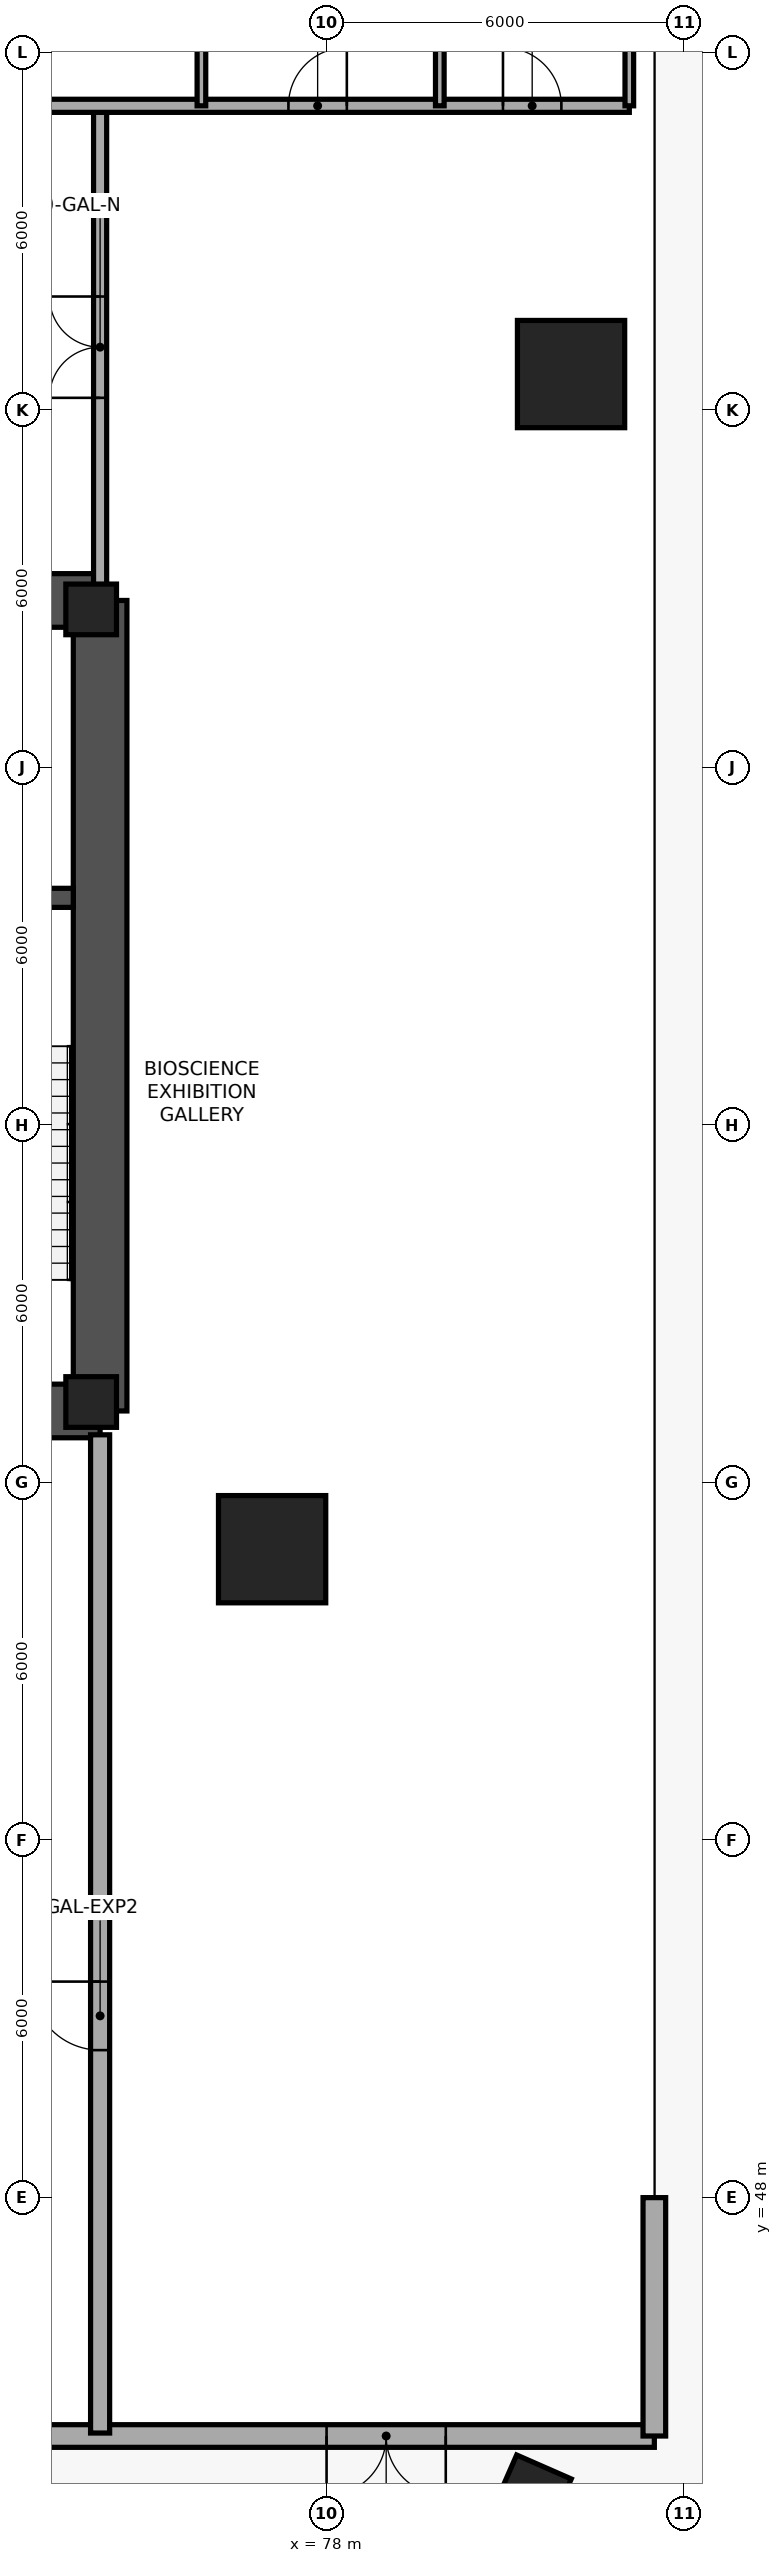
"""IFC4 building model, lengths in metres.
Left out: names, types, materials, properties, quantities, classifications, styles, units other than length and angle.
Written with IfcOpenShell. Run it as: python <this file> out.ifc"""

import sys

from ifc_helpers import new_model, si_unit, direction, frame, frame_2d, origin, origin_2d, place, context, subcontext, project, spatial, rectangle, extrude, element, fill, save


model = new_model("IFC4")
c1 = context("Model", 3, precision=1e-05, world=origin(), true_north=direction((0.0, 1.0)))
c2 = subcontext(c1, "Body", "Model", "MODEL_VIEW")
j1 = project(units=[si_unit("LENGTHUNIT", "METRE"), si_unit("PLANEANGLEUNIT", "RADIAN")], contexts=[c1])
p1 = place(None, origin())
s1 = spatial("IfcSite", under=j1, at=p1, CompositionType="ELEMENT")
p2 = place(p1, origin())
s2 = spatial("IfcBuilding", under=s1, at=p2, CompositionType="ELEMENT")
p3 = place(p2, origin())
s3 = spatial("IfcBuildingStorey", under=s2, at=p3, CompositionType="ELEMENT", Elevation=0.0)
p4 = place(p3, frame((57.8, 61.2, 0.0), z_axis=(0.0, 0.0, 1.0), x_axis=(1.0, 0.0, 0.0)))
e1 = element("IfcWall", 1, at=p4, inside=s3, PredefinedType="SHEAR", context=c2, shape_type="SweptSolid", body=[
    extrude(rectangle(XDim=16.4, YDim=0.9, at=frame_2d((8.2, 0.0))), origin(), (0.0, 0.0, 1.0), 5.4),
])
p5 = place(p4, frame((1.35, 0.0, 0.0)))
e2 = element("IfcOpeningElement", 2, at=p5, cuts=e1, PredefinedType="OPENING", context=c2, shape_type="SweptSolid", body=[
    extrude(rectangle(XDim=1.15, YDim=2.15, at=frame_2d((0.575, 1.075))), frame((0.0, 0.46, 0.0), z_axis=(0.0, -1.0, 0.0), x_axis=(1.0, 0.0, 0.0)), (0.0, 0.0, 1.0), 0.92),
])
p6 = place(p4, frame((6.1, 0.0, 0.0)))
e3 = element("IfcOpeningElement", 3, at=p6, cuts=e1, PredefinedType="OPENING", context=c2, shape_type="SweptSolid", body=[
    extrude(rectangle(XDim=1.6, YDim=2.15, at=frame_2d((0.8, 1.075))), frame((0.0, 0.46, 0.0), z_axis=(0.0, -1.0, 0.0), x_axis=(1.0, 0.0, 0.0)), (0.0, 0.0, 1.0), 0.92),
])
p7 = place(p4, frame((13.55, 0.0, 0.0)))
e4 = element("IfcOpeningElement", 4, at=p7, cuts=e1, PredefinedType="OPENING", context=c2, shape_type="SweptSolid", body=[
    extrude(rectangle(XDim=1.15, YDim=2.15, at=frame_2d((0.575, 1.075))), frame((0.0, 0.46, 0.0), z_axis=(0.0, -1.0, 0.0), x_axis=(1.0, 0.0, 0.0)), (0.0, 0.0, 1.0), 0.92),
])
p8 = place(p3, frame((74.2, 61.2, 0.0), z_axis=(0.0, 0.0, 1.0), x_axis=(0.0, 1.0, 0.0)))
e5 = element("IfcWall", 5, at=p8, inside=s3, PredefinedType="SHEAR", context=c2, shape_type="SweptSolid", body=[
    extrude(rectangle(XDim=13.6, YDim=0.9, at=frame_2d((6.8, 0.0))), origin(), (0.0, 0.0, 1.0), 5.4),
])
p9 = place(p3, frame((74.2, 74.8, 0.0), z_axis=(0.0, 0.0, 1.0), x_axis=(-1.0, 0.0, 0.0)))
e6 = element("IfcWall", 6, at=p9, inside=s3, PredefinedType="SHEAR", context=c2, shape_type="SweptSolid", body=[
    extrude(rectangle(XDim=7.35, YDim=0.9, at=frame_2d((3.675, 0.0))), origin(), (0.0, 0.0, 1.0), 5.4),
])
p10 = place(p3, frame((69.91, 69.81, 0.0), z_axis=(0.0, 0.0, 1.0), x_axis=(1.0, 0.0, 0.0)))
e7 = element("IfcWall", 7, at=p10, inside=s3, PredefinedType="SHEAR", context=c2, shape_type="SweptSolid", body=[
    extrude(rectangle(XDim=3.84, YDim=0.32, at=frame_2d((1.92, 0.0))), origin(), (0.0, 0.0, 1.0), 5.4),
])
for number, where, z_axis, x_axis in (
    (8, (74.05, 61.35, 0.0), (0.0, 0.0, 1.0), (1.0, 0.0, 0.0)),
    (9, (74.05, 74.65, 0.0), (0.0, 0.0, 1.0), (1.0, 0.0, 0.0)),
):
    element("IfcColumn", number, at=place(p3, frame(where, z_axis=z_axis, x_axis=x_axis)), inside=s3, PredefinedType="COLUMN", context=c2, shape_type="SweptSolid", body=[
        extrude(rectangle(XDim=0.85, YDim=0.85, at=origin_2d()), origin(), (0.0, 0.0, 1.0), 5.4),
    ])
for number, where, z_axis, x_axis in (
    (10, (82.102, 78.599, 0.0), (0.0, 0.0, 1.0), (1.0, 0.0, 0.0)),
    (11, (77.086, 58.88, 0.0), (0.0, 0.0, 1.0), (1.0, 0.0, 0.0)),
):
    element("IfcColumn", number, at=place(p3, frame(where, z_axis=z_axis, x_axis=x_axis)), inside=s3, PredefinedType="COLUMN", context=c2, shape_type="SweptSolid", body=[
        extrude(rectangle(XDim=1.8, YDim=1.8, at=origin_2d()), origin(), (0.0, 0.0, 1.0), 5.4),
    ])
p11 = place(p3, frame((81.483, 42.953, 0.003), z_axis=(-0.013301146081, 0.025878420267, 0.999576603807), x_axis=(0.061316028243, -0.997762628088, 0.026647376463)))
e12 = element("IfcColumn", 12, at=p11, inside=s3, PredefinedType="COLUMN", context=c2, shape_type="SweptSolid", body=[
    extrude(rectangle(XDim=1.0, YDim=1.0, at=origin_2d()), origin(), (0.0, 0.0, 1.0), 5.396),
])
p12 = place(p3, frame((83.5, 44.0, 0.0), z_axis=(0.0, 0.0, 1.0), x_axis=(-1.0, 0.0, 0.0)))
e13 = element("IfcWall", 13, at=p12, inside=s3, PredefinedType="STANDARD", context=c2, shape_type="SweptSolid", body=[
    extrude(rectangle(XDim=35.0, YDim=0.38, at=frame_2d((17.5, 0.0))), origin(), (0.0, 0.0, 1.0), 4.08),
])
p13 = place(p12, frame((3.5, 0.0, 0.0)))
e14 = element("IfcOpeningElement", 14, at=p13, cuts=e13, PredefinedType="OPENING", context=c2, shape_type="SweptSolid", body=[
    extrude(rectangle(XDim=2.0, YDim=2.25, at=frame_2d((1.0, 1.125))), frame((0.0, 0.2, 0.0), z_axis=(0.0, -1.0, 0.0), x_axis=(1.0, 0.0, 0.0)), (0.0, 0.0, 1.0), 0.4),
])
p14 = place(p12, frame((10.35, 0.0, 0.0)))
e15 = element("IfcOpeningElement", 15, at=p14, cuts=e13, PredefinedType="OPENING", context=c2, shape_type="SweptSolid", body=[
    extrude(rectangle(XDim=2.0, YDim=2.25, at=frame_2d((1.0, 1.125))), frame((0.0, 0.2, 0.0), z_axis=(0.0, -1.0, 0.0), x_axis=(1.0, 0.0, 0.0)), (0.0, 0.0, 1.0), 0.4),
])
p15 = place(p12, frame((16.4, 0.0, 0.0)))
e16 = element("IfcOpeningElement", 16, at=p15, cuts=e13, PredefinedType="OPENING", context=c2, shape_type="SweptSolid", body=[
    extrude(rectangle(XDim=2.2, YDim=2.6, at=frame_2d((1.1, 1.3))), frame((0.0, 0.2, 0.0), z_axis=(0.0, -1.0, 0.0), x_axis=(1.0, 0.0, 0.0)), (0.0, 0.0, 1.0), 0.4),
])
p16 = place(p12, frame((22.65, 0.0, 0.0)))
e17 = element("IfcOpeningElement", 17, at=p16, cuts=e13, PredefinedType="OPENING", context=c2, shape_type="SweptSolid", body=[
    extrude(rectangle(XDim=2.0, YDim=2.25, at=frame_2d((1.0, 1.125))), frame((0.0, 0.2, 0.0), z_axis=(0.0, -1.0, 0.0), x_axis=(1.0, 0.0, 0.0)), (0.0, 0.0, 1.0), 0.4),
])
p17 = place(p12, frame((29.2, 0.0, 0.0)))
e18 = element("IfcOpeningElement", 18, at=p17, cuts=e13, PredefinedType="OPENING", context=c2, shape_type="SweptSolid", body=[
    extrude(rectangle(XDim=2.0, YDim=2.25, at=frame_2d((1.0, 1.125))), frame((0.0, 0.2, 0.0), z_axis=(0.0, -1.0, 0.0), x_axis=(1.0, 0.0, 0.0)), (0.0, 0.0, 1.0), 0.4),
])
p18 = place(p3, frame((83.5, 48.0, 0.0), z_axis=(0.0, 0.0, 1.0), x_axis=(0.0, -1.0, 0.0)))
e19 = element("IfcWall", 19, at=p18, inside=s3, PredefinedType="STANDARD", context=c2, shape_type="SweptSolid", body=[
    extrude(rectangle(XDim=4.0, YDim=0.38, at=frame_2d((2.0, 0.0))), origin(), (0.0, 0.0, 1.0), 4.03),
])
p19 = place(p3, frame((74.2, 44.05, 0.0), z_axis=(0.0, 0.0, 1.0), x_axis=(0.0, 1.0, 0.0)))
e20 = element("IfcWall", 20, at=p19, inside=s3, PredefinedType="STANDARD", context=c2, shape_type="SweptSolid", body=[
    extrude(rectangle(XDim=16.75, YDim=0.32, at=frame_2d((8.375, 0.0))), origin(), (0.0, 0.0, 1.0), 4.08),
])
p20 = place(p19, frame((6.425, 0.0, 0.0)))
e21 = element("IfcOpeningElement", 21, at=p20, cuts=e20, PredefinedType="OPENING", context=c2, shape_type="SweptSolid", body=[
    extrude(rectangle(XDim=1.15, YDim=2.15, at=frame_2d((0.575, 1.075))), frame((0.0, 0.17, 0.0), z_axis=(0.0, -1.0, 0.0), x_axis=(1.0, 0.0, 0.0)), (0.0, 0.0, 1.0), 0.34),
])
p21 = place(p3, frame((74.2, 75.0, 0.0), z_axis=(0.0, 0.0, 1.0), x_axis=(0.0, 1.0, 0.0)))
e22 = element("IfcWall", 22, at=p21, inside=s3, PredefinedType="PARTITIONING", context=c2, shape_type="SweptSolid", body=[
    extrude(rectangle(XDim=8.1, YDim=0.22, at=frame_2d((4.05, 0.0))), origin(), (0.0, 0.0, 1.0), 4.08),
])
p22 = place(p21, frame((3.2, 0.0, 0.0)))
e23 = element("IfcOpeningElement", 23, at=p22, cuts=e22, PredefinedType="OPENING", context=c2, shape_type="SweptSolid", body=[
    extrude(rectangle(XDim=1.7, YDim=2.2, at=frame_2d((0.85, 1.1))), frame((0.0, 0.12, 0.0), z_axis=(0.0, -1.0, 0.0), x_axis=(1.0, 0.0, 0.0)), (0.0, 0.0, 1.0), 0.24),
])
p23 = place(p3, frame((48.5, 83.1, 0.0), z_axis=(0.0, 0.0, 1.0), x_axis=(1.0, 0.0, 0.0)))
e24 = element("IfcWall", 24, at=p23, inside=s3, PredefinedType="PARTITIONING", context=c2, shape_type="SweptSolid", body=[
    extrude(rectangle(XDim=34.58, YDim=0.22, at=frame_2d((17.29, 0.0))), origin(), (0.0, 0.0, 1.0), 4.03),
])
p24 = place(p23, frame((4.0, 0.0, 0.0)))
e25 = element("IfcOpeningElement", 25, at=p24, cuts=e24, PredefinedType="OPENING", context=c2, shape_type="SweptSolid", body=[
    extrude(rectangle(XDim=1.0, YDim=2.1, at=frame_2d((0.5, 1.05))), frame((0.0, 0.12, 0.0), z_axis=(0.0, -1.0, 0.0), x_axis=(1.0, 0.0, 0.0)), (0.0, 0.0, 1.0), 0.24),
])
p25 = place(p23, frame((19.704, 0.0, 0.0)))
e26 = element("IfcOpeningElement", 26, at=p25, cuts=e24, PredefinedType="OPENING", context=c2, shape_type="SweptSolid", body=[
    extrude(rectangle(XDim=1.5, YDim=2.2, at=frame_2d((0.75, 1.1))), frame((0.0, 0.12, 0.0), z_axis=(0.0, -1.0, 0.0), x_axis=(1.0, 0.0, 0.0)), (0.0, 0.0, 1.0), 0.24),
])
p26 = place(p23, frame((28.86, 0.0, 0.0)))
e27 = element("IfcOpeningElement", 27, at=p26, cuts=e24, PredefinedType="OPENING", context=c2, shape_type="SweptSolid", body=[
    extrude(rectangle(XDim=0.98, YDim=2.1, at=frame_2d((0.49, 1.05))), frame((0.0, 0.12, 0.0), z_axis=(0.0, -1.0, 0.0), x_axis=(1.0, 0.0, 0.0)), (0.0, 0.0, 1.0), 0.24),
])
p27 = place(p23, frame((32.46, 0.0, 0.0)))
e28 = element("IfcOpeningElement", 28, at=p27, cuts=e24, PredefinedType="OPENING", context=c2, shape_type="SweptSolid", body=[
    extrude(rectangle(XDim=0.98, YDim=2.1, at=frame_2d((0.49, 1.05))), frame((0.0, 0.12, 0.0), z_axis=(0.0, -1.0, 0.0), x_axis=(1.0, 0.0, 0.0)), (0.0, 0.0, 1.0), 0.24),
])
p28 = place(p3, frame((75.9, 83.1, 0.0), z_axis=(0.0, 0.0, 1.0), x_axis=(0.0, 1.0, 0.0)))
e29 = element("IfcWall", 29, at=p28, inside=s3, PredefinedType="PARTITIONING", context=c2, shape_type="SweptSolid", body=[
    extrude(rectangle(XDim=6.9, YDim=0.145, at=frame_2d((3.45, 0.0))), origin(), (0.0, 0.0, 1.0), 5.0),
])
p29 = place(p3, frame((79.9, 83.1, 0.0), z_axis=(0.0, 0.0, 1.0), x_axis=(0.0, 1.0, 0.0)))
e30 = element("IfcWall", 30, at=p29, inside=s3, PredefinedType="PARTITIONING", context=c2, shape_type="SweptSolid", body=[
    extrude(rectangle(XDim=3.8, YDim=0.145, at=frame_2d((1.9, 0.0))), origin(), (0.0, 0.0, 1.0), 5.0),
])
p30 = place(p3, frame((83.08, 83.1, 0.0), z_axis=(0.0, 0.0, 1.0), x_axis=(0.0, 1.0, 0.0)))
e31 = element("IfcWall", 31, at=p30, inside=s3, PredefinedType="PARTITIONING", context=c2, shape_type="SweptSolid", body=[
    extrude(rectangle(XDim=3.8, YDim=0.145, at=frame_2d((1.9, 0.0))), origin(), (0.0, 0.0, 1.0), 4.03),
])
p31 = place(p13, origin())
e32 = element("IfcDoor", 32, at=p31, inside=s3, OperationType="DOUBLE_DOOR_SINGLE_SWING", PredefinedType="DOOR", context=c2, shape_type="SweptSolid", body=[
    extrude(rectangle(XDim=2.0, YDim=2.25, at=frame_2d((1.0, 1.125))), frame((0.0, 0.025, 0.0), z_axis=(0.0, -1.0, 0.0), x_axis=(1.0, 0.0, 0.0)), (0.0, 0.0, 1.0), 0.05),
])
fill(e14, e32)
p32 = place(p20, origin())
e33 = element("IfcDoor", 33, at=p32, inside=s3, OperationType="SINGLE_SWING_RIGHT", PredefinedType="DOOR", context=c2, shape_type="SweptSolid", body=[
    extrude(rectangle(XDim=1.15, YDim=2.15, at=frame_2d((0.575, 1.075))), frame((0.0, 0.025, 0.0), z_axis=(0.0, -1.0, 0.0), x_axis=(1.0, 0.0, 0.0)), (0.0, 0.0, 1.0), 0.05),
])
fill(e21, e33)
p33 = place(p22, origin())
e34 = element("IfcDoor", 34, at=p33, inside=s3, OperationType="DOUBLE_DOOR_SINGLE_SWING", PredefinedType="DOOR", context=c2, shape_type="SweptSolid", body=[
    extrude(rectangle(XDim=1.7, YDim=2.2, at=frame_2d((0.85, 1.1))), frame((0.0, 0.025, 0.0), z_axis=(0.0, -1.0, 0.0), x_axis=(1.0, 0.0, 0.0)), (0.0, 0.0, 1.0), 0.05),
])
fill(e23, e34)
p34 = place(p26, origin())
e35 = element("IfcDoor", 35, at=p34, inside=s3, OperationType="SINGLE_SWING_RIGHT", PredefinedType="DOOR", context=c2, shape_type="SweptSolid", body=[
    extrude(rectangle(XDim=0.98, YDim=2.1, at=frame_2d((0.49, 1.05))), frame((0.0, 0.025, 0.0), z_axis=(0.0, -1.0, 0.0), x_axis=(1.0, 0.0, 0.0)), (0.0, 0.0, 1.0), 0.05),
])
fill(e27, e35)
p35 = place(p27, origin())
e36 = element("IfcDoor", 36, at=p35, inside=s3, OperationType="SINGLE_SWING_LEFT", PredefinedType="DOOR", context=c2, shape_type="SweptSolid", body=[
    extrude(rectangle(XDim=0.98, YDim=2.1, at=frame_2d((0.49, 1.05))), frame((0.0, 0.025, 0.0), z_axis=(0.0, -1.0, 0.0), x_axis=(1.0, 0.0, 0.0)), (0.0, 0.0, 1.0), 0.05),
])
fill(e28, e36)
save(model, sys.argv[1])
